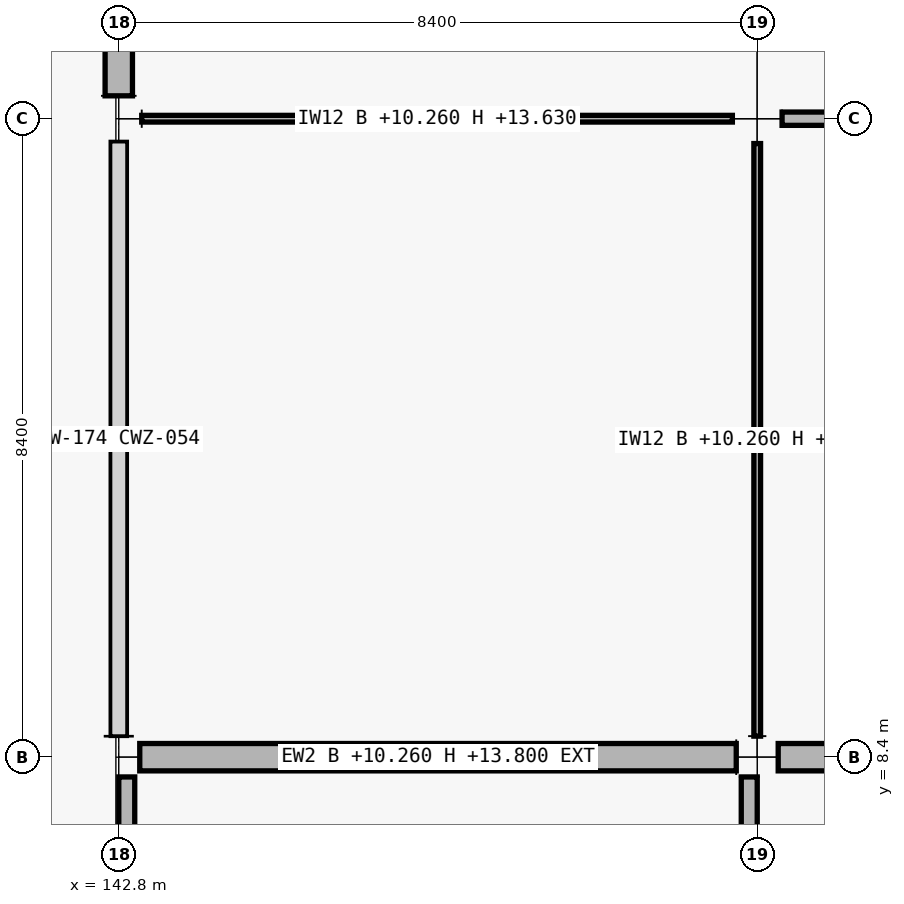
"""IFC4 building model, lengths in metres.
Left out: names, types, materials, properties, quantities, classifications, styles, units other than length and angle.
Written with IfcOpenShell. Run it as: python <this file> out.ifc"""

import sys

from ifc_helpers import new_model, si_unit, direction, frame, frame_2d, origin, origin_2d, place, context, subcontext, project, spatial, rectangle, extrude, element, fill, save


model = new_model("IFC4")
c1 = context("Model", 3, precision=1e-05, world=origin(), true_north=direction((0.0, 1.0)))
c2 = subcontext(c1, "Body", "Model", "MODEL_VIEW")
j1 = project(units=[si_unit("LENGTHUNIT", "METRE"), si_unit("PLANEANGLEUNIT", "RADIAN")], contexts=[c1])
p1 = place(None, origin())
s1 = spatial("IfcSite", under=j1, at=p1, CompositionType="ELEMENT")
p2 = place(p1, origin())
s2 = spatial("IfcBuilding", under=s1, at=p2, CompositionType="ELEMENT")
p3 = place(p2, frame((0.0, 0.0, 10.26)))
s3 = spatial("IfcBuildingStorey", under=s2, at=p3, CompositionType="ELEMENT", Elevation=10.26)
p4 = place(p3, frame((142.8, 8.4, 0.0), z_axis=(0.0, 0.0, 1.0), x_axis=(1.0, 0.0, 0.0)))
e1 = element("IfcColumn", 1, at=p4, inside=s3, PredefinedType="COLUMN", context=c2, shape_type="SweptSolid", body=[
    extrude(rectangle(XDim=0.55, YDim=0.55, at=origin_2d()), origin(), (0.0, 0.0, 1.0), 4.25),
])
p5 = place(p3, frame((142.8, 16.8, 0.0), z_axis=(0.0, 0.0, 1.0), x_axis=(1.0, 0.0, 0.0)))
e2 = element("IfcColumn", 2, at=p5, inside=s3, PredefinedType="COLUMN", context=c2, shape_type="SweptSolid", body=[
    extrude(rectangle(XDim=0.6, YDim=0.6, at=origin_2d()), origin(), (0.0, 0.0, 1.0), 4.5),
])
p6 = place(p3, frame((151.2, 8.4, 0.0), z_axis=(0.0, 0.0, 1.0), x_axis=(1.0, 0.0, 0.0)))
e3 = element("IfcColumn", 3, at=p6, inside=s3, PredefinedType="COLUMN", context=c2, shape_type="SweptSolid", body=[
    extrude(rectangle(XDim=0.55, YDim=0.55, at=origin_2d()), origin(), (0.0, 0.0, 1.0), 4.25),
])
p7 = place(p3, frame((151.2, 16.8, 0.0), z_axis=(0.0, 0.0, 1.0), x_axis=(1.0, 0.0, 0.0)))
e4 = element("IfcColumn", 4, at=p7, inside=s3, PredefinedType="COLUMN", context=c2, shape_type="SweptSolid", body=[
    extrude(rectangle(XDim=0.65, YDim=0.65, at=origin_2d()), origin(), (0.0, 0.0, 1.0), 4.5),
])
p8 = place(p3, frame((150.924, 8.4, 0.0), z_axis=(0.0, 0.0, 1.0), x_axis=(-1.0, 0.0, 0.0)))
e5 = element("IfcWall", 5, at=p8, inside=s3, PredefinedType="SOLIDWALL", context=c2, shape_type="SweptSolid", body=[
    extrude(rectangle(XDim=7.848, YDim=0.36, at=frame_2d((3.924, 0.0))), origin(), (0.0, 0.0, 1.0), 3.54),
])
p9 = place(p8, frame((2.899, 0.0, 0.9)))
e6 = element("IfcOpeningElement", 6, at=p9, cuts=e5, PredefinedType="OPENING", context=c2, shape_type="SweptSolid", body=[
    extrude(rectangle(XDim=2.05, YDim=1.45, at=frame_2d((1.025, 0.725))), frame((0.0, 0.18, 0.0), z_axis=(0.0, -1.0, 0.0), x_axis=(1.0, 0.0, 0.0)), (0.0, 0.0, 1.0), 0.36),
])
p10 = place(p3, frame((142.8, 17.101, 0.0), z_axis=(0.0, 0.0, 1.0), x_axis=(0.0, 1.0, 0.0)))
e7 = element("IfcWall", 7, at=p10, inside=s3, PredefinedType="SOLIDWALL", context=c2, shape_type="SweptSolid", body=[
    extrude(rectangle(XDim=7.773, YDim=0.36, at=frame_2d((3.886, 0.0))), origin(), (0.0, 0.0, 1.0), 3.54),
])
p11 = place(p10, frame((2.661, 0.0, 0.9)))
e8 = element("IfcOpeningElement", 8, at=p11, cuts=e7, PredefinedType="OPENING", context=c2, shape_type="SweptSolid", body=[
    extrude(rectangle(XDim=2.45, YDim=1.45, at=frame_2d((1.225, 0.725))), frame((0.0, 0.18, 0.0), z_axis=(0.0, -1.0, 0.0), x_axis=(1.0, 0.0, 0.0)), (0.0, 0.0, 1.0), 0.36),
])
p12 = place(p3, frame((159.324, 8.4, 0.0), z_axis=(0.0, 0.0, 1.0), x_axis=(-1.0, 0.0, 0.0)))
e9 = element("IfcWall", 9, at=p12, inside=s3, PredefinedType="SOLIDWALL", context=c2, shape_type="SweptSolid", body=[
    extrude(rectangle(XDim=7.848, YDim=0.36, at=frame_2d((3.924, 0.0))), origin(), (0.0, 0.0, 1.0), 3.54),
])
p13 = place(p12, frame((2.999, 0.0, 0.0)))
e10 = element("IfcOpeningElement", 10, at=p13, cuts=e9, PredefinedType="OPENING", context=c2, shape_type="SweptSolid", body=[
    extrude(rectangle(XDim=1.85, YDim=2.2, at=frame_2d((0.925, 1.1))), frame((0.0, 0.18, 0.0), z_axis=(0.0, -1.0, 0.0), x_axis=(1.0, 0.0, 0.0)), (0.0, 0.0, 1.0), 0.36),
])
for number, where, z_axis, x_axis in (
    (11, (142.905, 0.26, 0.0), (0.0, 0.0, 1.0), (0.0, 1.0, 0.0)),
    (12, (151.095, 8.14, 0.0), (0.0, 0.0, 1.0), (0.0, -1.0, 0.0)),
):
    element("IfcWall", number, at=place(p3, frame(where, z_axis=z_axis, x_axis=x_axis)), inside=s3, PredefinedType="PARAPET", context=c2, shape_type="SweptSolid", body=[
        extrude(rectangle(XDim=7.88, YDim=0.21, at=frame_2d((3.94, 0.0))), origin(), (0.0, 0.0, 1.0), 0.95),
    ])
p14 = place(p3, frame((143.102, 16.8, 0.0), z_axis=(0.0, 0.0, 1.0), x_axis=(1.0, 0.0, 0.0)))
e13 = element("IfcWall", 13, at=p14, inside=s3, PredefinedType="PARTITIONING", context=c2, shape_type="SweptSolid", body=[
    extrude(rectangle(XDim=7.771, YDim=0.088, at=frame_2d((3.885, 0.0))), origin(), (0.0, 0.0, 1.0), 3.37),
])
p15 = place(p14, frame((3.385, 0.0, 0.0)))
e14 = element("IfcOpeningElement", 14, at=p15, cuts=e13, PredefinedType="OPENING", context=c2, shape_type="SweptSolid", body=[
    extrude(rectangle(XDim=1.0, YDim=2.2, at=frame_2d((0.5, 1.1))), frame((0.0, 0.044, 0.0), z_axis=(0.0, -1.0, 0.0), x_axis=(1.0, 0.0, 0.0)), (0.0, 0.0, 1.0), 0.088),
])
p16 = place(p3, frame((151.527, 16.8, 0.0), z_axis=(0.0, 0.0, 1.0), x_axis=(1.0, 0.0, 0.0)))
e15 = element("IfcWall", 15, at=p16, inside=s3, PredefinedType="PARTITIONING", context=c2, shape_type="SweptSolid", body=[
    extrude(rectangle(XDim=7.771, YDim=0.175, at=frame_2d((3.885, 0.0))), origin(), (0.0, 0.0, 1.0), 3.37),
])
p17 = place(p16, frame((3.396, 0.0, 0.0)))
e16 = element("IfcOpeningElement", 16, at=p17, cuts=e15, PredefinedType="OPENING", context=c2, shape_type="SweptSolid", body=[
    extrude(rectangle(XDim=0.98, YDim=2.18, at=frame_2d((0.49, 1.09))), frame((0.0, 0.087, 0.0), z_axis=(0.0, -1.0, 0.0), x_axis=(1.0, 0.0, 0.0)), (0.0, 0.0, 1.0), 0.175),
])
p18 = place(p3, frame((151.2, 8.677, 0.0), z_axis=(0.0, 0.0, 1.0), x_axis=(0.0, 1.0, 0.0)))
e17 = element("IfcWall", 17, at=p18, inside=s3, PredefinedType="PARTITIONING", context=c2, shape_type="SweptSolid", body=[
    extrude(rectangle(XDim=7.796, YDim=0.088, at=frame_2d((3.898, 0.0))), origin(), (0.0, 0.0, 1.0), 3.37),
])
p19 = place(p18, frame((3.393, 0.0, 0.0)))
e18 = element("IfcOpeningElement", 18, at=p19, cuts=e17, PredefinedType="OPENING", context=c2, shape_type="SweptSolid", body=[
    extrude(rectangle(XDim=1.01, YDim=2.12, at=frame_2d((0.505, 1.06))), frame((0.0, 0.044, 0.0), z_axis=(0.0, -1.0, 0.0), x_axis=(1.0, 0.0, 0.0)), (0.0, 0.0, 1.0), 0.088),
])
p20 = place(p9, origin())
e19 = element("IfcWindow", 19, at=p20, inside=s3, PartitioningType="SINGLE_PANEL", PredefinedType="WINDOW", context=c2, shape_type="SweptSolid", body=[
    extrude(rectangle(XDim=2.05, YDim=1.45, at=frame_2d((1.025, 0.725))), frame((0.0, 0.03, 0.0), z_axis=(0.0, -1.0, 0.0), x_axis=(1.0, 0.0, 0.0)), (0.0, 0.0, 1.0), 0.06),
])
fill(e6, e19)
p21 = place(p15, origin())
e20 = element("IfcDoor", 20, at=p21, inside=s3, OperationType="SINGLE_SWING_RIGHT", PredefinedType="DOOR", context=c2, shape_type="SweptSolid", body=[
    extrude(rectangle(XDim=1.0, YDim=2.2, at=frame_2d((0.5, 1.1))), frame((0.0, 0.025, 0.0), z_axis=(0.0, -1.0, 0.0), x_axis=(1.0, 0.0, 0.0)), (0.0, 0.0, 1.0), 0.05),
])
fill(e14, e20)
p22 = place(p19, origin())
e21 = element("IfcDoor", 21, at=p22, inside=s3, OperationType="SINGLE_SWING_RIGHT", PredefinedType="DOOR", context=c2, shape_type="SweptSolid", body=[
    extrude(rectangle(XDim=1.01, YDim=2.12, at=frame_2d((0.505, 1.06))), frame((0.0, 0.025, 0.0), z_axis=(0.0, -1.0, 0.0), x_axis=(1.0, 0.0, 0.0)), (0.0, 0.0, 1.0), 0.05),
])
fill(e18, e21)
save(model, sys.argv[1])
